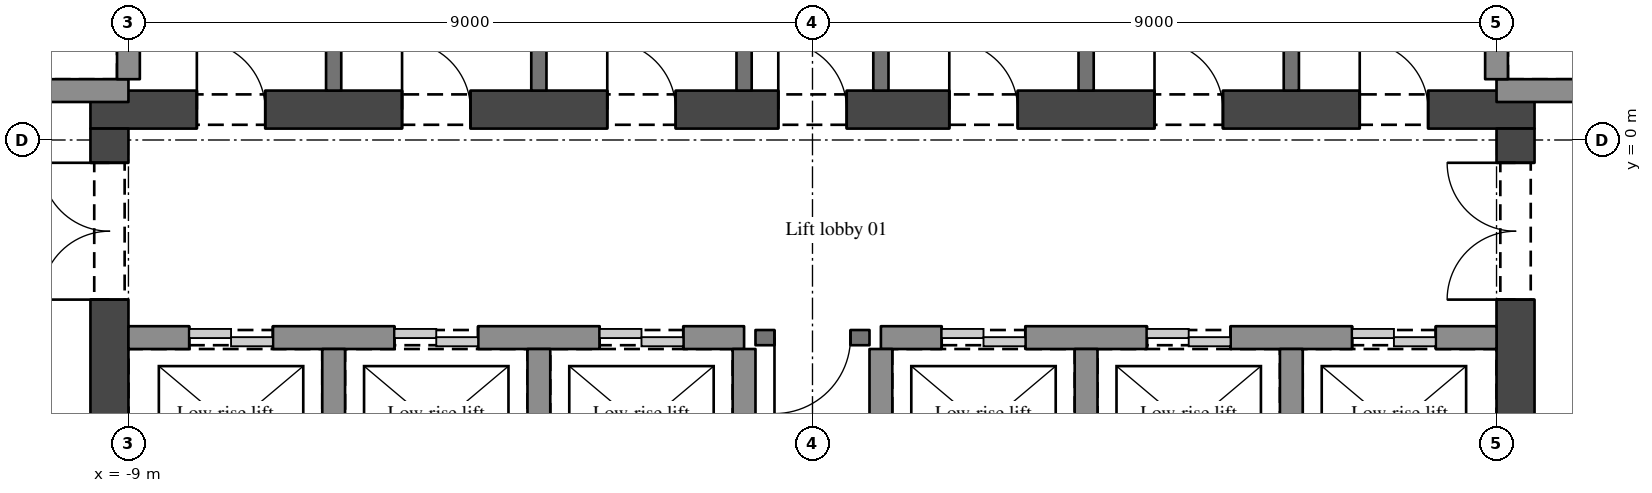
"""IFC4 building model, lengths in metres.
Left out: names, types, materials, properties, quantities, classifications, styles, units other than length and angle.
Written with IfcOpenShell. Run it as: python <this file> out.ifc"""

import sys

from ifc_helpers import new_model, si_unit, direction, frame, frame_2d, origin, place, context, subcontext, project, spatial, rectangle, extrude, element, fill, save


model = new_model("IFC4")
c1 = context("Model", 3, precision=1e-05, world=origin(), true_north=direction((0.0, 1.0)))
c2 = subcontext(c1, "Body", "Model", "MODEL_VIEW")
j1 = project(units=[si_unit("LENGTHUNIT", "METRE"), si_unit("PLANEANGLEUNIT", "RADIAN")], contexts=[c1])
p1 = place(None, origin())
s1 = spatial("IfcSite", under=j1, at=p1, CompositionType="ELEMENT")
p2 = place(p1, origin())
s2 = spatial("IfcBuilding", under=s1, at=p2, CompositionType="ELEMENT")
p3 = place(p2, frame((0.0, 0.0, 53.7)))
s3 = spatial("IfcBuildingStorey", under=s2, at=p3, CompositionType="ELEMENT", Elevation=53.7)
p4 = place(p3, frame((-9.5, 0.4, 0.0), z_axis=(0.0, 0.0, 1.0), x_axis=(1.0, 0.0, 0.0)))
e1 = element("IfcWall", 1, at=p4, inside=s3, PredefinedType="SHEAR", context=c2, shape_type="SweptSolid", body=[
    extrude(rectangle(XDim=19.0, YDim=0.5, at=frame_2d((9.5, 0.0))), origin(), (0.0, 0.0, 1.0), 3.9),
])
p5 = place(p4, frame((1.4, 0.0, 0.0)))
e2 = element("IfcOpeningElement", 2, at=p5, cuts=e1, PredefinedType="OPENING", context=c2, shape_type="SweptSolid", body=[
    extrude(rectangle(XDim=0.9, YDim=2.1, at=frame_2d((0.45, 1.05))), frame((0.0, 0.26, 0.0), z_axis=(0.0, -1.0, 0.0), x_axis=(1.0, 0.0, 0.0)), (0.0, 0.0, 1.0), 0.52),
])
p6 = place(p4, frame((4.1, 0.0, 0.0)))
e3 = element("IfcOpeningElement", 3, at=p6, cuts=e1, PredefinedType="OPENING", context=c2, shape_type="SweptSolid", body=[
    extrude(rectangle(XDim=0.9, YDim=2.1, at=frame_2d((0.45, 1.05))), frame((0.0, 0.26, 0.0), z_axis=(0.0, -1.0, 0.0), x_axis=(1.0, 0.0, 0.0)), (0.0, 0.0, 1.0), 0.52),
])
p7 = place(p4, frame((6.8, 0.0, 0.0)))
e4 = element("IfcOpeningElement", 4, at=p7, cuts=e1, PredefinedType="OPENING", context=c2, shape_type="SweptSolid", body=[
    extrude(rectangle(XDim=0.9, YDim=2.1, at=frame_2d((0.45, 1.05))), frame((0.0, 0.26, 0.0), z_axis=(0.0, -1.0, 0.0), x_axis=(1.0, 0.0, 0.0)), (0.0, 0.0, 1.0), 0.52),
])
p8 = place(p4, frame((11.3, 0.0, 0.0)))
e5 = element("IfcOpeningElement", 5, at=p8, cuts=e1, PredefinedType="OPENING", context=c2, shape_type="SweptSolid", body=[
    extrude(rectangle(XDim=0.9, YDim=2.1, at=frame_2d((0.45, 1.05))), frame((0.0, 0.26, 0.0), z_axis=(0.0, -1.0, 0.0), x_axis=(1.0, 0.0, 0.0)), (0.0, 0.0, 1.0), 0.52),
])
p9 = place(p4, frame((14.0, 0.0, 0.0)))
e6 = element("IfcOpeningElement", 6, at=p9, cuts=e1, PredefinedType="OPENING", context=c2, shape_type="SweptSolid", body=[
    extrude(rectangle(XDim=0.9, YDim=2.1, at=frame_2d((0.45, 1.05))), frame((0.0, 0.26, 0.0), z_axis=(0.0, -1.0, 0.0), x_axis=(1.0, 0.0, 0.0)), (0.0, 0.0, 1.0), 0.52),
])
p10 = place(p4, frame((16.7, 0.0, 0.0)))
e7 = element("IfcOpeningElement", 7, at=p10, cuts=e1, PredefinedType="OPENING", context=c2, shape_type="SweptSolid", body=[
    extrude(rectangle(XDim=0.9, YDim=2.1, at=frame_2d((0.45, 1.05))), frame((0.0, 0.26, 0.0), z_axis=(0.0, -1.0, 0.0), x_axis=(1.0, 0.0, 0.0)), (0.0, 0.0, 1.0), 0.52),
])
p11 = place(p4, frame((9.05, 0.0, 0.0)))
e8 = element("IfcOpeningElement", 8, at=p11, cuts=e1, PredefinedType="OPENING", context=c2, shape_type="SweptSolid", body=[
    extrude(rectangle(XDim=0.9, YDim=2.1, at=frame_2d((0.45, 1.05))), frame((0.0, 0.26, 0.0), z_axis=(0.0, -1.0, 0.0), x_axis=(1.0, 0.0, 0.0)), (0.0, 0.0, 1.0), 0.52),
])
p12 = place(p3, frame((-9.25, -11.5, 0.0), z_axis=(0.0, 0.0, 1.0), x_axis=(0.0, 1.0, 0.0)))
e9 = element("IfcWall", 9, at=p12, inside=s3, PredefinedType="SHEAR", context=c2, shape_type="SweptSolid", body=[
    extrude(rectangle(XDim=11.65, YDim=0.5, at=frame_2d((5.825, 0.0))), origin(), (0.0, 0.0, 1.0), 3.9),
])
p13 = place(p12, frame((9.4, 0.0, 0.0)))
e10 = element("IfcOpeningElement", 10, at=p13, cuts=e9, PredefinedType="OPENING", context=c2, shape_type="SweptSolid", body=[
    extrude(rectangle(XDim=1.8, YDim=2.1, at=frame_2d((0.9, 1.05))), frame((0.0, 0.26, 0.0), z_axis=(0.0, -1.0, 0.0), x_axis=(1.0, 0.0, 0.0)), (0.0, 0.0, 1.0), 0.52),
])
p14 = place(p12, frame((5.25, 0.0, 0.0)))
e11 = element("IfcOpeningElement", 11, at=p14, cuts=e9, PredefinedType="OPENING", context=c2, shape_type="SweptSolid", body=[
    extrude(rectangle(XDim=1.1, YDim=2.1, at=frame_2d((0.55, 1.05))), frame((0.0, 0.26, 0.0), z_axis=(0.0, -1.0, 0.0), x_axis=(1.0, 0.0, 0.0)), (0.0, 0.0, 1.0), 0.52),
])
p15 = place(p3, frame((9.25, -11.5, 0.0), z_axis=(0.0, 0.0, 1.0), x_axis=(0.0, 1.0, 0.0)))
e12 = element("IfcWall", 12, at=p15, inside=s3, PredefinedType="SHEAR", context=c2, shape_type="SweptSolid", body=[
    extrude(rectangle(XDim=11.65, YDim=0.5, at=frame_2d((5.825, 0.0))), origin(), (0.0, 0.0, 1.0), 3.9),
])
p16 = place(p15, frame((9.4, 0.0, 0.0)))
e13 = element("IfcOpeningElement", 13, at=p16, cuts=e12, PredefinedType="OPENING", context=c2, shape_type="SweptSolid", body=[
    extrude(rectangle(XDim=1.8, YDim=2.1, at=frame_2d((0.9, 1.05))), frame((0.0, 0.26, 0.0), z_axis=(0.0, -1.0, 0.0), x_axis=(1.0, 0.0, 0.0)), (0.0, 0.0, 1.0), 0.52),
])
p17 = place(p15, frame((5.25, 0.0, 0.0)))
e14 = element("IfcOpeningElement", 14, at=p17, cuts=e12, PredefinedType="OPENING", context=c2, shape_type="SweptSolid", body=[
    extrude(rectangle(XDim=1.1, YDim=2.1, at=frame_2d((0.55, 1.05))), frame((0.0, 0.26, 0.0), z_axis=(0.0, -1.0, 0.0), x_axis=(1.0, 0.0, 0.0)), (0.0, 0.0, 1.0), 0.52),
])
p18 = place(p3, frame((-9.0, -2.6, 0.0), z_axis=(0.0, 0.0, 1.0), x_axis=(1.0, 0.0, 0.0)))
e15 = element("IfcWall", 15, at=p18, inside=s3, PredefinedType="SHEAR", context=c2, shape_type="SweptSolid", body=[
    extrude(rectangle(XDim=8.1, YDim=0.3, at=frame_2d((4.05, 0.0))), origin(), (0.0, 0.0, 1.0), 3.9),
])
p19 = place(p18, frame((0.8, 0.0, 0.0)))
e16 = element("IfcOpeningElement", 16, at=p19, cuts=e15, PredefinedType="OPENING", context=c2, shape_type="SweptSolid", body=[
    extrude(rectangle(XDim=1.1, YDim=2.1, at=frame_2d((0.55, 1.05))), frame((0.0, 0.16, 0.0), z_axis=(0.0, -1.0, 0.0), x_axis=(1.0, 0.0, 0.0)), (0.0, 0.0, 1.0), 0.32),
])
p20 = place(p18, frame((3.5, 0.0, 0.0)))
e17 = element("IfcOpeningElement", 17, at=p20, cuts=e15, PredefinedType="OPENING", context=c2, shape_type="SweptSolid", body=[
    extrude(rectangle(XDim=1.1, YDim=2.1, at=frame_2d((0.55, 1.05))), frame((0.0, 0.16, 0.0), z_axis=(0.0, -1.0, 0.0), x_axis=(1.0, 0.0, 0.0)), (0.0, 0.0, 1.0), 0.32),
])
p21 = place(p18, frame((6.2, 0.0, 0.0)))
e18 = element("IfcOpeningElement", 18, at=p21, cuts=e15, PredefinedType="OPENING", context=c2, shape_type="SweptSolid", body=[
    extrude(rectangle(XDim=1.1, YDim=2.1, at=frame_2d((0.55, 1.05))), frame((0.0, 0.16, 0.0), z_axis=(0.0, -1.0, 0.0), x_axis=(1.0, 0.0, 0.0)), (0.0, 0.0, 1.0), 0.32),
])
p22 = place(p3, frame((0.75, -2.6, 0.0), z_axis=(0.0, 0.0, 1.0), x_axis=(-1.0, 0.0, 0.0)))
e19 = element("IfcWall", 19, at=p22, inside=s3, PredefinedType="SOLIDWALL", context=c2, shape_type="SweptSolid", body=[
    extrude(rectangle(XDim=1.5, YDim=0.2, at=frame_2d((0.75, 0.0))), origin(), (0.0, 0.0, 1.0), 3.6),
])
p23 = place(p22, frame((0.25, 0.0, 0.0)))
e20 = element("IfcOpeningElement", 20, at=p23, cuts=e19, PredefinedType="OPENING", context=c2, shape_type="SweptSolid", body=[
    extrude(rectangle(XDim=1.0, YDim=2.1, at=frame_2d((0.5, 1.05))), frame((0.0, 0.11, 0.0), z_axis=(0.0, -1.0, 0.0), x_axis=(1.0, 0.0, 0.0)), (0.0, 0.0, 1.0), 0.22),
])
p24 = place(p3, frame((0.9, -2.6, 0.0), z_axis=(0.0, 0.0, 1.0), x_axis=(1.0, 0.0, 0.0)))
e21 = element("IfcWall", 21, at=p24, inside=s3, PredefinedType="SHEAR", context=c2, shape_type="SweptSolid", body=[
    extrude(rectangle(XDim=8.1, YDim=0.3, at=frame_2d((4.05, 0.0))), origin(), (0.0, 0.0, 1.0), 3.9),
])
p25 = place(p24, frame((0.8, 0.0, 0.0)))
e22 = element("IfcOpeningElement", 22, at=p25, cuts=e21, PredefinedType="OPENING", context=c2, shape_type="SweptSolid", body=[
    extrude(rectangle(XDim=1.1, YDim=2.1, at=frame_2d((0.55, 1.05))), frame((0.0, 0.16, 0.0), z_axis=(0.0, -1.0, 0.0), x_axis=(1.0, 0.0, 0.0)), (0.0, 0.0, 1.0), 0.32),
])
p26 = place(p24, frame((3.5, 0.0, 0.0)))
e23 = element("IfcOpeningElement", 23, at=p26, cuts=e21, PredefinedType="OPENING", context=c2, shape_type="SweptSolid", body=[
    extrude(rectangle(XDim=1.1, YDim=2.1, at=frame_2d((0.55, 1.05))), frame((0.0, 0.16, 0.0), z_axis=(0.0, -1.0, 0.0), x_axis=(1.0, 0.0, 0.0)), (0.0, 0.0, 1.0), 0.32),
])
p27 = place(p24, frame((6.2, 0.0, 0.0)))
e24 = element("IfcOpeningElement", 24, at=p27, cuts=e21, PredefinedType="OPENING", context=c2, shape_type="SweptSolid", body=[
    extrude(rectangle(XDim=1.1, YDim=2.1, at=frame_2d((0.55, 1.05))), frame((0.0, 0.16, 0.0), z_axis=(0.0, -1.0, 0.0), x_axis=(1.0, 0.0, 0.0)), (0.0, 0.0, 1.0), 0.32),
])
for number, where, z_axis, x_axis in (
    (25, (-9.0, 0.65, 0.0), (0.0, 0.0, 1.0), (-1.0, 0.0, 0.0)),
    (26, (12.25, 0.65, 0.0), (0.0, 0.0, 1.0), (-1.0, 0.0, 0.0)),
):
    element("IfcWall", number, at=place(p3, frame(where, z_axis=z_axis, x_axis=x_axis)), inside=s3, PredefinedType="SHEAR", context=c2, shape_type="SweptSolid", body=[
        extrude(rectangle(XDim=3.25, YDim=0.3, at=frame_2d((1.625, 0.0))), origin(), (0.0, 0.0, 1.0), 3.9),
    ])
p28 = place(p3, frame((-9.0, 0.8, 0.0), z_axis=(0.0, 0.0, 1.0), x_axis=(0.0, 1.0, 0.0)))
e27 = element("IfcWall", 27, at=p28, inside=s3, PredefinedType="SHEAR", context=c2, shape_type="SweptSolid", body=[
    extrude(rectangle(XDim=2.35, YDim=0.3, at=frame_2d((1.175, 0.0))), origin(), (0.0, 0.0, 1.0), 3.9),
])
p29 = place(p3, frame((-6.3, -4.8, 0.0), z_axis=(0.0, 0.0, 1.0), x_axis=(0.0, 1.0, 0.0)))
e28 = element("IfcWall", 28, at=p29, inside=s3, PredefinedType="SHEAR", context=c2, shape_type="SweptSolid", body=[
    extrude(rectangle(XDim=2.05, YDim=0.3, at=frame_2d((1.025, 0.0))), origin(), (0.0, 0.0, 1.0), 3.9),
])
p30 = place(p3, frame((-6.3, 0.65, 0.0), z_axis=(0.0, 0.0, 1.0), x_axis=(0.0, 1.0, 0.0)))
e29 = element("IfcWall", 29, at=p30, inside=s3, PredefinedType="SOLIDWALL", context=c2, shape_type="SweptSolid", body=[
    extrude(rectangle(XDim=2.5, YDim=0.2, at=frame_2d((1.25, 0.0))), origin(), (0.0, 0.0, 1.0), 3.6),
])
p31 = place(p3, frame((-3.6, -4.8, 0.0), z_axis=(0.0, 0.0, 1.0), x_axis=(0.0, 1.0, 0.0)))
e30 = element("IfcWall", 30, at=p31, inside=s3, PredefinedType="SHEAR", context=c2, shape_type="SweptSolid", body=[
    extrude(rectangle(XDim=2.05, YDim=0.3, at=frame_2d((1.025, 0.0))), origin(), (0.0, 0.0, 1.0), 3.9),
])
p32 = place(p3, frame((-3.6, 0.65, 0.0), z_axis=(0.0, 0.0, 1.0), x_axis=(0.0, 1.0, 0.0)))
e31 = element("IfcWall", 31, at=p32, inside=s3, PredefinedType="SOLIDWALL", context=c2, shape_type="SweptSolid", body=[
    extrude(rectangle(XDim=2.5, YDim=0.2, at=frame_2d((1.25, 0.0))), origin(), (0.0, 0.0, 1.0), 3.6),
])
p33 = place(p3, frame((-0.9, -4.8, 0.0), z_axis=(0.0, 0.0, 1.0), x_axis=(0.0, 1.0, 0.0)))
e32 = element("IfcWall", 32, at=p33, inside=s3, PredefinedType="SHEAR", context=c2, shape_type="SweptSolid", body=[
    extrude(rectangle(XDim=2.05, YDim=0.3, at=frame_2d((1.025, 0.0))), origin(), (0.0, 0.0, 1.0), 3.9),
])
p34 = place(p3, frame((-0.9, 0.65, 0.0), z_axis=(0.0, 0.0, 1.0), x_axis=(0.0, 1.0, 0.0)))
e33 = element("IfcWall", 33, at=p34, inside=s3, PredefinedType="SOLIDWALL", context=c2, shape_type="SweptSolid", body=[
    extrude(rectangle(XDim=2.5, YDim=0.2, at=frame_2d((1.25, 0.0))), origin(), (0.0, 0.0, 1.0), 3.6),
])
p35 = place(p3, frame((0.9, -4.8, 0.0), z_axis=(0.0, 0.0, 1.0), x_axis=(0.0, 1.0, 0.0)))
e34 = element("IfcWall", 34, at=p35, inside=s3, PredefinedType="SHEAR", context=c2, shape_type="SweptSolid", body=[
    extrude(rectangle(XDim=2.05, YDim=0.3, at=frame_2d((1.025, 0.0))), origin(), (0.0, 0.0, 1.0), 3.9),
])
p36 = place(p3, frame((0.9, 0.65, 0.0), z_axis=(0.0, 0.0, 1.0), x_axis=(0.0, 1.0, 0.0)))
e35 = element("IfcWall", 35, at=p36, inside=s3, PredefinedType="SOLIDWALL", context=c2, shape_type="SweptSolid", body=[
    extrude(rectangle(XDim=2.5, YDim=0.2, at=frame_2d((1.25, 0.0))), origin(), (0.0, 0.0, 1.0), 3.6),
])
p37 = place(p3, frame((3.6, -4.8, 0.0), z_axis=(0.0, 0.0, 1.0), x_axis=(0.0, 1.0, 0.0)))
e36 = element("IfcWall", 36, at=p37, inside=s3, PredefinedType="SHEAR", context=c2, shape_type="SweptSolid", body=[
    extrude(rectangle(XDim=2.05, YDim=0.3, at=frame_2d((1.025, 0.0))), origin(), (0.0, 0.0, 1.0), 3.9),
])
p38 = place(p3, frame((3.6, 0.65, 0.0), z_axis=(0.0, 0.0, 1.0), x_axis=(0.0, 1.0, 0.0)))
e37 = element("IfcWall", 37, at=p38, inside=s3, PredefinedType="SOLIDWALL", context=c2, shape_type="SweptSolid", body=[
    extrude(rectangle(XDim=2.5, YDim=0.2, at=frame_2d((1.25, 0.0))), origin(), (0.0, 0.0, 1.0), 3.6),
])
p39 = place(p3, frame((6.3, -4.8, 0.0), z_axis=(0.0, 0.0, 1.0), x_axis=(0.0, 1.0, 0.0)))
e38 = element("IfcWall", 38, at=p39, inside=s3, PredefinedType="SHEAR", context=c2, shape_type="SweptSolid", body=[
    extrude(rectangle(XDim=2.05, YDim=0.3, at=frame_2d((1.025, 0.0))), origin(), (0.0, 0.0, 1.0), 3.9),
])
p40 = place(p3, frame((6.3, 0.65, 0.0), z_axis=(0.0, 0.0, 1.0), x_axis=(0.0, 1.0, 0.0)))
e39 = element("IfcWall", 39, at=p40, inside=s3, PredefinedType="SOLIDWALL", context=c2, shape_type="SweptSolid", body=[
    extrude(rectangle(XDim=2.5, YDim=0.2, at=frame_2d((1.25, 0.0))), origin(), (0.0, 0.0, 1.0), 3.6),
])
p41 = place(p3, frame((9.0, 0.8, 0.0), z_axis=(0.0, 0.0, 1.0), x_axis=(0.0, 1.0, 0.0)))
e40 = element("IfcWall", 40, at=p41, inside=s3, PredefinedType="SHEAR", context=c2, shape_type="SweptSolid", body=[
    extrude(rectangle(XDim=2.35, YDim=0.3, at=frame_2d((1.175, 0.0))), origin(), (0.0, 0.0, 1.0), 3.9),
])
p42 = place(p16, origin())
e41 = element("IfcDoor", 41, at=p42, inside=s3, OperationType="DOUBLE_DOOR_SINGLE_SWING", PredefinedType="DOOR", context=c2, shape_type="SweptSolid", body=[
    extrude(rectangle(XDim=1.8, YDim=2.1, at=frame_2d((0.9, 1.05))), frame((0.0, 0.025, 0.0), z_axis=(0.0, -1.0, 0.0), x_axis=(1.0, 0.0, 0.0)), (0.0, 0.0, 1.0), 0.05),
])
fill(e13, e41)
p43 = place(p13, origin())
e42 = element("IfcDoor", 42, at=p43, inside=s3, OperationType="DOUBLE_DOOR_SINGLE_SWING", PredefinedType="DOOR", context=c2, shape_type="SweptSolid", body=[
    extrude(rectangle(XDim=1.8, YDim=2.1, at=frame_2d((0.9, 1.05))), frame((0.0, 0.025, 0.0), z_axis=(0.0, -1.0, 0.0), x_axis=(1.0, 0.0, 0.0)), (0.0, 0.0, 1.0), 0.05),
])
fill(e10, e42)
p44 = place(p23, origin())
e43 = element("IfcDoor", 43, at=p44, inside=s3, OperationType="SINGLE_SWING_RIGHT", PredefinedType="DOOR", context=c2, shape_type="SweptSolid", body=[
    extrude(rectangle(XDim=1.0, YDim=2.1, at=frame_2d((0.5, 1.05))), frame((0.0, 0.025, 0.0), z_axis=(0.0, -1.0, 0.0), x_axis=(1.0, 0.0, 0.0)), (0.0, 0.0, 1.0), 0.05),
])
fill(e20, e43)
p45 = place(p5, origin())
e44 = element("IfcDoor", 44, at=p45, inside=s3, OperationType="SINGLE_SWING_LEFT", PredefinedType="DOOR", context=c2, shape_type="SweptSolid", body=[
    extrude(rectangle(XDim=0.9, YDim=2.1, at=frame_2d((0.45, 1.05))), frame((0.0, 0.025, 0.0), z_axis=(0.0, -1.0, 0.0), x_axis=(1.0, 0.0, 0.0)), (0.0, 0.0, 1.0), 0.05),
])
fill(e2, e44)
p46 = place(p6, origin())
e45 = element("IfcDoor", 45, at=p46, inside=s3, OperationType="SINGLE_SWING_LEFT", PredefinedType="DOOR", context=c2, shape_type="SweptSolid", body=[
    extrude(rectangle(XDim=0.9, YDim=2.1, at=frame_2d((0.45, 1.05))), frame((0.0, 0.025, 0.0), z_axis=(0.0, -1.0, 0.0), x_axis=(1.0, 0.0, 0.0)), (0.0, 0.0, 1.0), 0.05),
])
fill(e3, e45)
p47 = place(p7, origin())
e46 = element("IfcDoor", 46, at=p47, inside=s3, OperationType="SINGLE_SWING_LEFT", PredefinedType="DOOR", context=c2, shape_type="SweptSolid", body=[
    extrude(rectangle(XDim=0.9, YDim=2.1, at=frame_2d((0.45, 1.05))), frame((0.0, 0.025, 0.0), z_axis=(0.0, -1.0, 0.0), x_axis=(1.0, 0.0, 0.0)), (0.0, 0.0, 1.0), 0.05),
])
fill(e4, e46)
p48 = place(p8, origin())
e47 = element("IfcDoor", 47, at=p48, inside=s3, OperationType="SINGLE_SWING_LEFT", PredefinedType="DOOR", context=c2, shape_type="SweptSolid", body=[
    extrude(rectangle(XDim=0.9, YDim=2.1, at=frame_2d((0.45, 1.05))), frame((0.0, 0.025, 0.0), z_axis=(0.0, -1.0, 0.0), x_axis=(1.0, 0.0, 0.0)), (0.0, 0.0, 1.0), 0.05),
])
fill(e5, e47)
p49 = place(p9, origin())
e48 = element("IfcDoor", 48, at=p49, inside=s3, OperationType="SINGLE_SWING_LEFT", PredefinedType="DOOR", context=c2, shape_type="SweptSolid", body=[
    extrude(rectangle(XDim=0.9, YDim=2.1, at=frame_2d((0.45, 1.05))), frame((0.0, 0.025, 0.0), z_axis=(0.0, -1.0, 0.0), x_axis=(1.0, 0.0, 0.0)), (0.0, 0.0, 1.0), 0.05),
])
fill(e6, e48)
p50 = place(p10, origin())
e49 = element("IfcDoor", 49, at=p50, inside=s3, OperationType="SINGLE_SWING_LEFT", PredefinedType="DOOR", context=c2, shape_type="SweptSolid", body=[
    extrude(rectangle(XDim=0.9, YDim=2.1, at=frame_2d((0.45, 1.05))), frame((0.0, 0.025, 0.0), z_axis=(0.0, -1.0, 0.0), x_axis=(1.0, 0.0, 0.0)), (0.0, 0.0, 1.0), 0.05),
])
fill(e7, e49)
p51 = place(p11, origin())
e50 = element("IfcDoor", 50, at=p51, inside=s3, OperationType="SINGLE_SWING_LEFT", PredefinedType="DOOR", context=c2, shape_type="SweptSolid", body=[
    extrude(rectangle(XDim=0.9, YDim=2.1, at=frame_2d((0.45, 1.05))), frame((0.0, 0.025, 0.0), z_axis=(0.0, -1.0, 0.0), x_axis=(1.0, 0.0, 0.0)), (0.0, 0.0, 1.0), 0.05),
])
fill(e8, e50)
p52 = place(p19, origin())
e51 = element("IfcDoor", 51, at=p52, inside=s3, OperationType="DOUBLE_DOOR_SLIDING", PredefinedType="DOOR", context=c2, shape_type="SweptSolid", body=[
    extrude(rectangle(XDim=1.1, YDim=2.1, at=frame_2d((0.55, 1.05))), frame((0.0, 0.025, 0.0), z_axis=(0.0, -1.0, 0.0), x_axis=(1.0, 0.0, 0.0)), (0.0, 0.0, 1.0), 0.05),
])
fill(e16, e51)
p53 = place(p20, origin())
e52 = element("IfcDoor", 52, at=p53, inside=s3, OperationType="DOUBLE_DOOR_SLIDING", PredefinedType="DOOR", context=c2, shape_type="SweptSolid", body=[
    extrude(rectangle(XDim=1.1, YDim=2.1, at=frame_2d((0.55, 1.05))), frame((0.0, 0.025, 0.0), z_axis=(0.0, -1.0, 0.0), x_axis=(1.0, 0.0, 0.0)), (0.0, 0.0, 1.0), 0.05),
])
fill(e17, e52)
p54 = place(p21, origin())
e53 = element("IfcDoor", 53, at=p54, inside=s3, OperationType="DOUBLE_DOOR_SLIDING", PredefinedType="DOOR", context=c2, shape_type="SweptSolid", body=[
    extrude(rectangle(XDim=1.1, YDim=2.1, at=frame_2d((0.55, 1.05))), frame((0.0, 0.025, 0.0), z_axis=(0.0, -1.0, 0.0), x_axis=(1.0, 0.0, 0.0)), (0.0, 0.0, 1.0), 0.05),
])
fill(e18, e53)
p55 = place(p25, origin())
e54 = element("IfcDoor", 54, at=p55, inside=s3, OperationType="DOUBLE_DOOR_SLIDING", PredefinedType="DOOR", context=c2, shape_type="SweptSolid", body=[
    extrude(rectangle(XDim=1.1, YDim=2.1, at=frame_2d((0.55, 1.05))), frame((0.0, 0.025, 0.0), z_axis=(0.0, -1.0, 0.0), x_axis=(1.0, 0.0, 0.0)), (0.0, 0.0, 1.0), 0.05),
])
fill(e22, e54)
p56 = place(p26, origin())
e55 = element("IfcDoor", 55, at=p56, inside=s3, OperationType="DOUBLE_DOOR_SLIDING", PredefinedType="DOOR", context=c2, shape_type="SweptSolid", body=[
    extrude(rectangle(XDim=1.1, YDim=2.1, at=frame_2d((0.55, 1.05))), frame((0.0, 0.025, 0.0), z_axis=(0.0, -1.0, 0.0), x_axis=(1.0, 0.0, 0.0)), (0.0, 0.0, 1.0), 0.05),
])
fill(e23, e55)
p57 = place(p27, origin())
e56 = element("IfcDoor", 56, at=p57, inside=s3, OperationType="DOUBLE_DOOR_SLIDING", PredefinedType="DOOR", context=c2, shape_type="SweptSolid", body=[
    extrude(rectangle(XDim=1.1, YDim=2.1, at=frame_2d((0.55, 1.05))), frame((0.0, 0.025, 0.0), z_axis=(0.0, -1.0, 0.0), x_axis=(1.0, 0.0, 0.0)), (0.0, 0.0, 1.0), 0.05),
])
fill(e24, e56)
save(model, sys.argv[1])
